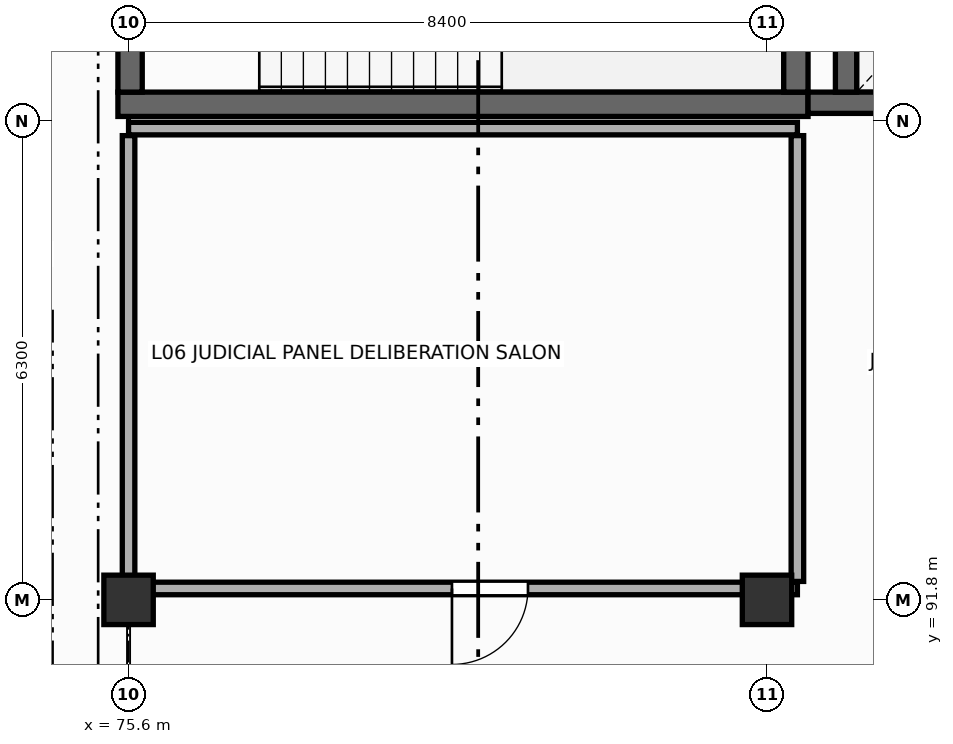
"""IFC4 building model, lengths in metres.
Left out: names, types, materials, properties, quantities, classifications, styles, units other than length and angle.
Written with IfcOpenShell. Run it as: python <this file> out.ifc"""

import sys

from ifc_helpers import new_model, si_unit, direction, frame, frame_2d, origin, origin_2d, place, context, subcontext, project, spatial, rectangle, extrude, element, fill, save


model = new_model("IFC4")
c1 = context("Model", 3, precision=1e-05, world=origin(), true_north=direction((0.0, 1.0)))
c2 = subcontext(c1, "Body", "Model", "MODEL_VIEW")
j1 = project(units=[si_unit("LENGTHUNIT", "METRE"), si_unit("PLANEANGLEUNIT", "RADIAN")], contexts=[c1])
p1 = place(None, origin())
s1 = spatial("IfcSite", under=j1, at=p1, CompositionType="ELEMENT")
p2 = place(p1, origin())
s2 = spatial("IfcBuilding", under=s1, at=p2, CompositionType="ELEMENT")
p3 = place(p2, frame((0.0, 0.0, 22.8)))
s3 = spatial("IfcBuildingStorey", under=s2, at=p3, CompositionType="ELEMENT", Elevation=22.8)
for number, where, z_axis, x_axis in (
    (1, (75.6, 91.8, 0.0), (0.0, 0.0, 1.0), (1.0, 0.0, 0.0)),
    (2, (84.0, 91.8, 0.0), (0.0, 0.0, 1.0), (1.0, 0.0, 0.0)),
):
    element("IfcColumn", number, at=place(p3, frame(where, z_axis=z_axis, x_axis=x_axis)), inside=s3, PredefinedType="COLUMN", context=c2, shape_type="SweptSolid", body=[
        extrude(rectangle(XDim=0.65, YDim=0.65, at=origin_2d()), origin(), (0.0, 0.0, 1.0), 4.2),
    ])
p4 = place(p3, frame((84.54, 98.32, 0.0), z_axis=(0.0, 0.0, 1.0), x_axis=(-1.0, 0.0, 0.0)))
e3 = element("IfcWall", 3, at=p4, inside=s3, PredefinedType="SHEAR", context=c2, shape_type="SweptSolid", body=[
    extrude(rectangle(XDim=9.08, YDim=0.32, at=frame_2d((4.54, 0.0))), origin(), (0.0, 0.0, 1.0), 3.97),
])
p5 = place(p3, frame((75.62, 98.48, 0.0), z_axis=(0.0, 0.0, 1.0), x_axis=(0.0, 1.0, 0.0)))
e4 = element("IfcWall", 4, at=p5, inside=s3, PredefinedType="SHEAR", context=c2, shape_type="SweptSolid", body=[
    extrude(rectangle(XDim=3.28, YDim=0.32, at=frame_2d((1.64, 0.0))), origin(), (0.0, 0.0, 1.0), 3.97),
])
p6 = place(p5, frame((1.065, 0.0, 0.0)))
e5 = element("IfcOpeningElement", 5, at=p6, cuts=e4, PredefinedType="OPENING", context=c2, shape_type="SweptSolid", body=[
    extrude(rectangle(XDim=1.15, YDim=2.2, at=frame_2d((0.575, 1.1))), frame((0.0, 0.17, 0.0), z_axis=(0.0, -1.0, 0.0), x_axis=(1.0, 0.0, 0.0)), (0.0, 0.0, 1.0), 0.34),
])
p7 = place(p3, frame((84.38, 101.76, 0.0), z_axis=(0.0, 0.0, 1.0), x_axis=(0.0, -1.0, 0.0)))
e6 = element("IfcWall", 6, at=p7, inside=s3, PredefinedType="SHEAR", context=c2, shape_type="SweptSolid", body=[
    extrude(rectangle(XDim=3.28, YDim=0.32, at=frame_2d((1.64, 0.0))), origin(), (0.0, 0.0, 1.0), 3.97),
])
p8 = place(p3, frame((87.7, 98.34, 0.0), z_axis=(0.0, 0.0, 1.0), x_axis=(-1.0, 0.0, 0.0)))
e7 = element("IfcWall", 7, at=p8, inside=s3, PredefinedType="SHEAR", context=c2, shape_type="SweptSolid", body=[
    extrude(rectangle(XDim=3.16, YDim=0.28, at=frame_2d((1.58, 0.0))), origin(), (0.0, 0.0, 1.0), 3.97),
])
p9 = place(p8, frame((0.925, 0.0, 0.0)))
e8 = element("IfcOpeningElement", 8, at=p9, cuts=e7, PredefinedType="OPENING", context=c2, shape_type="SweptSolid", body=[
    extrude(rectangle(XDim=0.95, YDim=2.15, at=frame_2d((0.475, 1.075))), frame((0.0, 0.15, 0.0), z_axis=(0.0, -1.0, 0.0), x_axis=(1.0, 0.0, 0.0)), (0.0, 0.0, 1.0), 0.3),
])
p10 = place(p3, frame((85.04, 98.48, 0.0), z_axis=(0.0, 0.0, 1.0), x_axis=(0.0, 1.0, 0.0)))
e9 = element("IfcWall", 9, at=p10, inside=s3, PredefinedType="SHEAR", context=c2, shape_type="SweptSolid", body=[
    extrude(rectangle(XDim=2.44, YDim=0.28, at=frame_2d((1.22, 0.0))), origin(), (0.0, 0.0, 1.0), 3.97),
])
p11 = place(p3, frame((75.6, 98.0, 0.0), z_axis=(0.0, 0.0, 1.0), x_axis=(1.0, 0.0, 0.0)))
e10 = element("IfcWall", 10, at=p11, inside=s3, PredefinedType="PARTITIONING", context=c2, shape_type="SweptSolid", body=[
    extrude(rectangle(XDim=8.8, YDim=0.165, at=frame_2d((4.4, 0.0))), origin(), (0.0, 0.0, 1.0), 3.1),
])
p12 = place(p3, frame((84.4, 91.95, 0.0), z_axis=(0.0, 0.0, 1.0), x_axis=(-1.0, 0.0, 0.0)))
e11 = element("IfcWall", 11, at=p12, inside=s3, PredefinedType="PARTITIONING", context=c2, shape_type="SweptSolid", body=[
    extrude(rectangle(XDim=8.8, YDim=0.165, at=frame_2d((4.4, 0.0))), origin(), (0.0, 0.0, 1.0), 3.1),
])
p13 = place(p12, frame((3.545, 0.0, 0.0)))
e12 = element("IfcOpeningElement", 12, at=p13, cuts=e11, PredefinedType="OPENING", context=c2, shape_type="SweptSolid", body=[
    extrude(rectangle(XDim=1.0, YDim=2.15, at=frame_2d((0.5, 1.075))), frame((0.0, 0.093, 0.0), z_axis=(0.0, -1.0, 0.0), x_axis=(1.0, 0.0, 0.0)), (0.0, 0.0, 1.0), 0.185),
])
for number, where, z_axis, x_axis in (
    (13, (75.6, 92.042, 0.0), (0.0, 0.0, 1.0), (0.0, 1.0, 0.0)),
    (14, (84.4, 97.907, 0.0), (0.0, 0.0, 1.0), (0.0, -1.0, 0.0)),
):
    element("IfcWall", number, at=place(p3, frame(where, z_axis=z_axis, x_axis=x_axis)), inside=s3, PredefinedType="PARTITIONING", context=c2, shape_type="SweptSolid", body=[
        extrude(rectangle(XDim=5.865, YDim=0.165, at=frame_2d((2.933, 0.0))), origin(), (0.0, 0.0, 1.0), 3.1),
    ])
p14 = place(p13, origin())
e15 = element("IfcDoor", 15, at=p14, inside=s3, OperationType="SINGLE_SWING_RIGHT", PredefinedType="DOOR", context=c2, shape_type="SweptSolid", body=[
    extrude(rectangle(XDim=1.0, YDim=2.15, at=frame_2d((0.5, 1.075))), frame((0.0, 0.025, 0.0), z_axis=(0.0, -1.0, 0.0), x_axis=(1.0, 0.0, 0.0)), (0.0, 0.0, 1.0), 0.05),
])
fill(e12, e15)
save(model, sys.argv[1])
